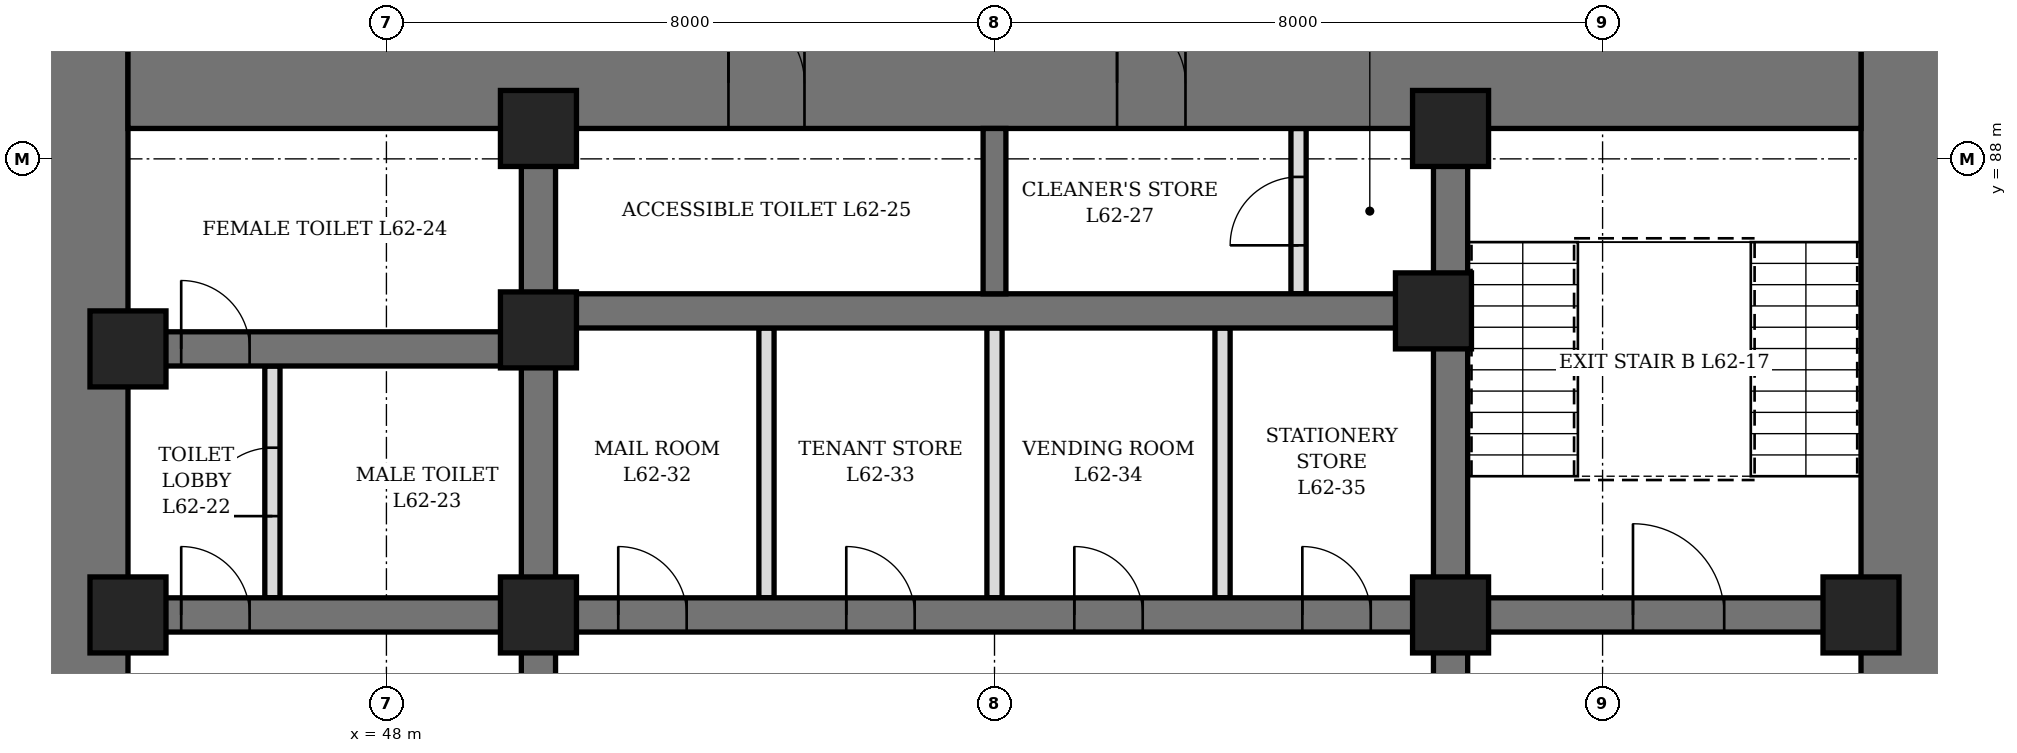
"""IFC4 building model, lengths in metres.
Left out: names, types, materials, properties, quantities, classifications, styles, units other than length and angle.
Written with IfcOpenShell. Run it as: python <this file> out.ifc"""

import sys

from ifc_helpers import new_model, si_unit, direction, frame, frame_2d, origin, origin_2d, place, context, subcontext, project, spatial, rectangle, hollow_rectangle, extrude, element, fill, save


model = new_model("IFC4")
c1 = context("Model", 3, precision=1e-05, world=origin(), true_north=direction((0.0, 1.0)))
c2 = subcontext(c1, "Body", "Model", "MODEL_VIEW")
j1 = project(units=[si_unit("LENGTHUNIT", "METRE"), si_unit("PLANEANGLEUNIT", "RADIAN")], contexts=[c1])
p1 = place(None, origin())
s1 = spatial("IfcSite", under=j1, at=p1, CompositionType="ELEMENT")
p2 = place(p1, origin())
s2 = spatial("IfcBuilding", under=s1, at=p2, CompositionType="ELEMENT")
p3 = place(p2, frame((0.0, 0.0, 275.5)))
s3 = spatial("IfcBuildingStorey", under=s2, at=p3, CompositionType="ELEMENT", Elevation=275.5)
p4 = place(p3, frame((44.0, 70.4, 0.0), z_axis=(0.0, 0.0, 1.0), x_axis=(0.0, 1.0, 0.0)))
e1 = element("IfcWall", 1, at=p4, inside=s3, PredefinedType="SHEAR", context=c2, shape_type="SweptSolid", body=[
    extrude(rectangle(XDim=19.2, YDim=1.2, at=frame_2d((9.6, 0.0))), origin(), (0.0, 0.0, 1.0), 4.2),
])
p5 = place(p4, frame((8.6, 0.0, 0.0)))
e2 = element("IfcOpeningElement", 2, at=p5, cuts=e1, PredefinedType="OPENING", context=c2, shape_type="SweptSolid", body=[
    extrude(rectangle(XDim=2.0, YDim=2.4, at=frame_2d((1.0, 1.2))), frame((0.0, 0.61, 0.0), z_axis=(0.0, -1.0, 0.0), x_axis=(1.0, 0.0, 0.0)), (0.0, 0.0, 1.0), 1.22),
])
p6 = place(p3, frame((68.0, 70.4, 0.0), z_axis=(0.0, 0.0, 1.0), x_axis=(0.0, 1.0, 0.0)))
e3 = element("IfcWall", 3, at=p6, inside=s3, PredefinedType="SHEAR", context=c2, shape_type="SweptSolid", body=[
    extrude(rectangle(XDim=19.2, YDim=1.2, at=frame_2d((9.6, 0.0))), origin(), (0.0, 0.0, 1.0), 4.2),
])
p7 = place(p6, frame((8.6, 0.0, 0.0)))
e4 = element("IfcOpeningElement", 4, at=p7, cuts=e3, PredefinedType="OPENING", context=c2, shape_type="SweptSolid", body=[
    extrude(rectangle(XDim=2.0, YDim=2.4, at=frame_2d((1.0, 1.2))), frame((0.0, 0.61, 0.0), z_axis=(0.0, -1.0, 0.0), x_axis=(1.0, 0.0, 0.0)), (0.0, 0.0, 1.0), 1.22),
])
p8 = place(p3, frame((44.6, 89.0, 0.0), z_axis=(0.0, 0.0, 1.0), x_axis=(1.0, 0.0, 0.0)))
e5 = element("IfcWall", 5, at=p8, inside=s3, PredefinedType="SHEAR", context=c2, shape_type="SweptSolid", body=[
    extrude(rectangle(XDim=22.8, YDim=1.2, at=frame_2d((11.4, 0.0))), origin(), (0.0, 0.0, 1.0), 4.2),
])
p9 = place(p8, frame((7.9, 0.0, 0.0)))
e6 = element("IfcOpeningElement", 6, at=p9, cuts=e5, PredefinedType="OPENING", context=c2, shape_type="SweptSolid", body=[
    extrude(rectangle(XDim=1.0, YDim=2.1, at=frame_2d((0.5, 1.05))), frame((0.0, 0.61, 0.0), z_axis=(0.0, -1.0, 0.0), x_axis=(1.0, 0.0, 0.0)), (0.0, 0.0, 1.0), 1.22),
])
p10 = place(p8, frame((13.012, 0.0, 0.0)))
e7 = element("IfcOpeningElement", 7, at=p10, cuts=e5, PredefinedType="OPENING", context=c2, shape_type="SweptSolid", body=[
    extrude(rectangle(XDim=0.9, YDim=2.1, at=frame_2d((0.45, 1.05))), frame((0.0, 0.61, 0.0), z_axis=(0.0, -1.0, 0.0), x_axis=(1.0, 0.0, 0.0)), (0.0, 0.0, 1.0), 1.22),
])
p11 = place(p3, frame((50.0, 71.6, 0.0), z_axis=(0.0, 0.0, 1.0), x_axis=(0.0, 1.0, 0.0)))
e8 = element("IfcWall", 8, at=p11, inside=s3, PredefinedType="SHEAR", context=c2, shape_type="SweptSolid", body=[
    extrude(rectangle(XDim=16.8, YDim=0.45, at=frame_2d((8.4, 0.0))), origin(), (0.0, 0.0, 1.0), 4.2),
])
p12 = place(p11, frame((7.5, 0.0, 0.0)))
e9 = element("IfcOpeningElement", 9, at=p12, cuts=e8, PredefinedType="OPENING", context=c2, shape_type="SweptSolid", body=[
    extrude(rectangle(XDim=1.8, YDim=2.4, at=frame_2d((0.9, 1.2))), frame((0.0, 0.235, 0.0), z_axis=(0.0, -1.0, 0.0), x_axis=(1.0, 0.0, 0.0)), (0.0, 0.0, 1.0), 0.47),
])
p13 = place(p3, frame((62.0, 71.6, 0.0), z_axis=(0.0, 0.0, 1.0), x_axis=(0.0, 1.0, 0.0)))
e10 = element("IfcWall", 10, at=p13, inside=s3, PredefinedType="SHEAR", context=c2, shape_type="SweptSolid", body=[
    extrude(rectangle(XDim=16.8, YDim=0.45, at=frame_2d((8.4, 0.0))), origin(), (0.0, 0.0, 1.0), 4.2),
])
p14 = place(p13, frame((7.5, 0.0, 0.0)))
e11 = element("IfcOpeningElement", 11, at=p14, cuts=e10, PredefinedType="OPENING", context=c2, shape_type="SweptSolid", body=[
    extrude(rectangle(XDim=1.8, YDim=2.4, at=frame_2d((0.9, 1.2))), frame((0.0, 0.235, 0.0), z_axis=(0.0, -1.0, 0.0), x_axis=(1.0, 0.0, 0.0)), (0.0, 0.0, 1.0), 0.47),
])
p15 = place(p3, frame((44.6, 82.0, 0.0), z_axis=(0.0, 0.0, 1.0), x_axis=(1.0, 0.0, 0.0)))
e12 = element("IfcWall", 12, at=p15, inside=s3, PredefinedType="SHEAR", context=c2, shape_type="SweptSolid", body=[
    extrude(rectangle(XDim=5.175, YDim=0.45, at=frame_2d((2.587, 0.0))), origin(), (0.0, 0.0, 1.0), 4.2),
])
p16 = place(p15, frame((0.7, 0.0, 0.0)))
e13 = element("IfcOpeningElement", 13, at=p16, cuts=e12, PredefinedType="OPENING", context=c2, shape_type="SweptSolid", body=[
    extrude(rectangle(XDim=0.9, YDim=2.1, at=frame_2d((0.45, 1.05))), frame((0.0, 0.235, 0.0), z_axis=(0.0, -1.0, 0.0), x_axis=(1.0, 0.0, 0.0)), (0.0, 0.0, 1.0), 0.47),
])
p17 = place(p3, frame((44.6, 85.5, 0.0), z_axis=(0.0, 0.0, 1.0), x_axis=(1.0, 0.0, 0.0)))
e14 = element("IfcWall", 14, at=p17, inside=s3, PredefinedType="SHEAR", context=c2, shape_type="SweptSolid", body=[
    extrude(rectangle(XDim=5.175, YDim=0.45, at=frame_2d((2.587, 0.0))), origin(), (0.0, 0.0, 1.0), 4.2),
])
p18 = place(p17, frame((0.7, 0.0, 0.0)))
e15 = element("IfcOpeningElement", 15, at=p18, cuts=e14, PredefinedType="OPENING", context=c2, shape_type="SweptSolid", body=[
    extrude(rectangle(XDim=0.9, YDim=2.1, at=frame_2d((0.45, 1.05))), frame((0.0, 0.235, 0.0), z_axis=(0.0, -1.0, 0.0), x_axis=(1.0, 0.0, 0.0)), (0.0, 0.0, 1.0), 0.47),
])
p19 = place(p3, frame((62.225, 82.0, 0.0), z_axis=(0.0, 0.0, 1.0), x_axis=(1.0, 0.0, 0.0)))
e16 = element("IfcWall", 16, at=p19, inside=s3, PredefinedType="SHEAR", context=c2, shape_type="SweptSolid", body=[
    extrude(rectangle(XDim=5.175, YDim=0.45, at=frame_2d((2.587, 0.0))), origin(), (0.0, 0.0, 1.0), 4.2),
])
p20 = place(p19, frame((2.175, 0.0, 0.0)))
e17 = element("IfcOpeningElement", 17, at=p20, cuts=e16, PredefinedType="OPENING", context=c2, shape_type="SweptSolid", body=[
    extrude(rectangle(XDim=1.2, YDim=2.1, at=frame_2d((0.6, 1.05))), frame((0.0, 0.235, 0.0), z_axis=(0.0, -1.0, 0.0), x_axis=(1.0, 0.0, 0.0)), (0.0, 0.0, 1.0), 0.47),
])
p21 = place(p3, frame((50.225, 82.0, 0.0), z_axis=(0.0, 0.0, 1.0), x_axis=(1.0, 0.0, 0.0)))
e18 = element("IfcWall", 18, at=p21, inside=s3, PredefinedType="SHEAR", context=c2, shape_type="SweptSolid", body=[
    extrude(rectangle(XDim=11.55, YDim=0.45, at=frame_2d((5.775, 0.0))), origin(), (0.0, 0.0, 1.0), 4.2),
])
p22 = place(p21, frame((0.825, 0.0, 0.0)))
e19 = element("IfcOpeningElement", 19, at=p22, cuts=e18, PredefinedType="OPENING", context=c2, shape_type="SweptSolid", body=[
    extrude(rectangle(XDim=0.9, YDim=2.1, at=frame_2d((0.45, 1.05))), frame((0.0, 0.235, 0.0), z_axis=(0.0, -1.0, 0.0), x_axis=(1.0, 0.0, 0.0)), (0.0, 0.0, 1.0), 0.47),
])
p23 = place(p21, frame((3.825, 0.0, 0.0)))
e20 = element("IfcOpeningElement", 20, at=p23, cuts=e18, PredefinedType="OPENING", context=c2, shape_type="SweptSolid", body=[
    extrude(rectangle(XDim=0.9, YDim=2.1, at=frame_2d((0.45, 1.05))), frame((0.0, 0.235, 0.0), z_axis=(0.0, -1.0, 0.0), x_axis=(1.0, 0.0, 0.0)), (0.0, 0.0, 1.0), 0.47),
])
p24 = place(p21, frame((6.825, 0.0, 0.0)))
e21 = element("IfcOpeningElement", 21, at=p24, cuts=e18, PredefinedType="OPENING", context=c2, shape_type="SweptSolid", body=[
    extrude(rectangle(XDim=0.9, YDim=2.1, at=frame_2d((0.45, 1.05))), frame((0.0, 0.235, 0.0), z_axis=(0.0, -1.0, 0.0), x_axis=(1.0, 0.0, 0.0)), (0.0, 0.0, 1.0), 0.47),
])
p25 = place(p21, frame((9.825, 0.0, 0.0)))
e22 = element("IfcOpeningElement", 22, at=p25, cuts=e18, PredefinedType="OPENING", context=c2, shape_type="SweptSolid", body=[
    extrude(rectangle(XDim=0.9, YDim=2.1, at=frame_2d((0.45, 1.05))), frame((0.0, 0.235, 0.0), z_axis=(0.0, -1.0, 0.0), x_axis=(1.0, 0.0, 0.0)), (0.0, 0.0, 1.0), 0.47),
])
p26 = place(p3, frame((50.225, 86.0, 0.0), z_axis=(0.0, 0.0, 1.0), x_axis=(1.0, 0.0, 0.0)))
e23 = element("IfcWall", 23, at=p26, inside=s3, PredefinedType="SHEAR", context=c2, shape_type="SweptSolid", body=[
    extrude(rectangle(XDim=11.55, YDim=0.45, at=frame_2d((5.775, 0.0))), origin(), (0.0, 0.0, 1.0), 4.2),
])
p27 = place(p3, frame((56.0, 86.225, 0.0), z_axis=(0.0, 0.0, 1.0), x_axis=(0.0, 1.0, 0.0)))
e24 = element("IfcWall", 24, at=p27, inside=s3, PredefinedType="SHEAR", context=c2, shape_type="SweptSolid", body=[
    extrude(rectangle(XDim=2.175, YDim=0.3, at=frame_2d((1.087, 0.0))), origin(), (0.0, 0.0, 1.0), 4.2),
])
for number, where, z_axis, x_axis in (
    (25, (44.6, 82.0, 0.0), (0.0, 0.0, 1.0), (1.0, 0.0, 0.0)),
    (26, (44.6, 85.5, 0.0), (0.0, 0.0, 1.0), (1.0, 0.0, 0.0)),
    (27, (50.0, 82.0, 0.0), (0.0, 0.0, 1.0), (1.0, 0.0, 0.0)),
    (28, (50.0, 85.75, 0.0), (0.0, 0.0, 1.0), (1.0, 0.0, 0.0)),
    (29, (50.0, 88.4, 0.0), (0.0, 0.0, 1.0), (1.0, 0.0, 0.0)),
    (30, (61.775, 86.0, 0.0), (0.0, 0.0, 1.0), (1.0, 0.0, 0.0)),
    (31, (62.0, 82.0, 0.0), (0.0, 0.0, 1.0), (1.0, 0.0, 0.0)),
    (32, (62.0, 88.4, 0.0), (0.0, 0.0, 1.0), (1.0, 0.0, 0.0)),
    (33, (67.4, 82.0, 0.0), (0.0, 0.0, 1.0), (1.0, 0.0, 0.0)),
):
    element("IfcColumn", number, at=place(p3, frame(where, z_axis=z_axis, x_axis=x_axis)), inside=s3, PredefinedType="COLUMN", context=c2, shape_type="SweptSolid", body=[
        extrude(hollow_rectangle(XDim=1.0, YDim=1.0, WallThickness=0.15, at=origin_2d()), origin(), (0.0, 0.0, 1.0), 4.2),
    ])
p28 = place(p3, frame((46.5, 82.225, 0.0), z_axis=(0.0, 0.0, 1.0), x_axis=(0.0, 1.0, 0.0)))
e34 = element("IfcWall", 34, at=p28, inside=s3, PredefinedType="PARTITIONING", context=c2, shape_type="SweptSolid", body=[
    extrude(rectangle(XDim=3.05, YDim=0.2, at=frame_2d((1.525, 0.0))), origin(), (0.0, 0.0, 1.0), 3.95),
])
p29 = place(p28, frame((1.075, 0.0, 0.0)))
e35 = element("IfcOpeningElement", 35, at=p29, cuts=e34, PredefinedType="OPENING", context=c2, shape_type="SweptSolid", body=[
    extrude(rectangle(XDim=0.9, YDim=2.1, at=frame_2d((0.45, 1.05))), frame((0.0, 0.11, 0.0), z_axis=(0.0, -1.0, 0.0), x_axis=(1.0, 0.0, 0.0)), (0.0, 0.0, 1.0), 0.22),
])
p30 = place(p3, frame((60.0, 86.225, 0.0), z_axis=(0.0, 0.0, 1.0), x_axis=(0.0, 1.0, 0.0)))
e36 = element("IfcWall", 36, at=p30, inside=s3, PredefinedType="PARTITIONING", context=c2, shape_type="SweptSolid", body=[
    extrude(rectangle(XDim=2.175, YDim=0.2, at=frame_2d((1.087, 0.0))), origin(), (0.0, 0.0, 1.0), 3.95),
])
p31 = place(p30, frame((0.637, 0.0, 0.0)))
e37 = element("IfcOpeningElement", 37, at=p31, cuts=e36, PredefinedType="OPENING", context=c2, shape_type="SweptSolid", body=[
    extrude(rectangle(XDim=0.9, YDim=2.1, at=frame_2d((0.45, 1.05))), frame((0.0, 0.11, 0.0), z_axis=(0.0, -1.0, 0.0), x_axis=(1.0, 0.0, 0.0)), (0.0, 0.0, 1.0), 0.22),
])
p32 = place(p3, frame((53.0, 82.225, 0.0), z_axis=(0.0, 0.0, 1.0), x_axis=(0.0, 1.0, 0.0)))
e38 = element("IfcWall", 38, at=p32, inside=s3, PredefinedType="PARTITIONING", context=c2, shape_type="SweptSolid", body=[
    extrude(rectangle(XDim=3.55, YDim=0.2, at=frame_2d((1.775, 0.0))), origin(), (0.0, 0.0, 1.0), 3.95),
])
p33 = place(p3, frame((56.0, 82.225, 0.0), z_axis=(0.0, 0.0, 1.0), x_axis=(0.0, 1.0, 0.0)))
e39 = element("IfcWall", 39, at=p33, inside=s3, PredefinedType="PARTITIONING", context=c2, shape_type="SweptSolid", body=[
    extrude(rectangle(XDim=3.55, YDim=0.2, at=frame_2d((1.775, 0.0))), origin(), (0.0, 0.0, 1.0), 2.45),
])
p34 = place(p3, frame((59.0, 82.225, 0.0), z_axis=(0.0, 0.0, 1.0), x_axis=(0.0, 1.0, 0.0)))
e40 = element("IfcWall", 40, at=p34, inside=s3, PredefinedType="PARTITIONING", context=c2, shape_type="SweptSolid", body=[
    extrude(rectangle(XDim=3.55, YDim=0.2, at=frame_2d((1.775, 0.0))), origin(), (0.0, 0.0, 1.0), 3.95),
])
p35 = place(p16, origin())
e41 = element("IfcDoor", 41, at=p35, inside=s3, OperationType="SINGLE_SWING_LEFT", PredefinedType="DOOR", context=c2, shape_type="SweptSolid", body=[
    extrude(rectangle(XDim=0.9, YDim=2.1, at=frame_2d((0.45, 1.05))), frame((0.0, 0.225, 0.0), z_axis=(0.0, -1.0, 0.0), x_axis=(1.0, 0.0, 0.0)), (0.0, 0.0, 1.0), 0.449),
])
fill(e13, e41)
p36 = place(p29, origin())
e42 = element("IfcDoor", 42, at=p36, inside=s3, OperationType="SINGLE_SWING_RIGHT", PredefinedType="DOOR", context=c2, shape_type="SweptSolid", body=[
    extrude(rectangle(XDim=0.9, YDim=2.1, at=frame_2d((0.45, 1.05))), frame((0.0, 0.1, 0.0), z_axis=(0.0, -1.0, 0.0), x_axis=(1.0, 0.0, 0.0)), (0.0, 0.0, 1.0), 0.199),
])
fill(e35, e42)
p37 = place(p18, origin())
e43 = element("IfcDoor", 43, at=p37, inside=s3, OperationType="SINGLE_SWING_RIGHT", PredefinedType="DOOR", context=c2, shape_type="SweptSolid", body=[
    extrude(rectangle(XDim=0.9, YDim=2.1, at=frame_2d((0.45, 1.05))), frame((0.0, 0.225, 0.0), z_axis=(0.0, -1.0, 0.0), x_axis=(1.0, 0.0, 0.0)), (0.0, 0.0, 1.0), 0.449),
])
fill(e15, e43)
p38 = place(p9, origin())
e44 = element("IfcDoor", 44, at=p38, inside=s3, OperationType="SINGLE_SWING_LEFT", PredefinedType="DOOR", context=c2, shape_type="SweptSolid", body=[
    extrude(rectangle(XDim=1.0, YDim=2.1, at=frame_2d((0.5, 1.05))), frame((0.0, 0.35, 0.0), z_axis=(0.0, -1.0, 0.0), x_axis=(1.0, 0.0, 0.0)), (0.0, 0.0, 1.0), 0.7),
])
fill(e6, e44)
p39 = place(p10, origin())
e45 = element("IfcDoor", 45, at=p39, inside=s3, OperationType="SINGLE_SWING_LEFT", PredefinedType="DOOR", context=c2, shape_type="SweptSolid", body=[
    extrude(rectangle(XDim=0.9, YDim=2.1, at=frame_2d((0.45, 1.05))), frame((0.0, 0.35, 0.0), z_axis=(0.0, -1.0, 0.0), x_axis=(1.0, 0.0, 0.0)), (0.0, 0.0, 1.0), 0.7),
])
fill(e7, e45)
p40 = place(p31, origin())
e46 = element("IfcDoor", 46, at=p40, inside=s3, OperationType="SINGLE_SWING_LEFT", PredefinedType="DOOR", context=c2, shape_type="SweptSolid", body=[
    extrude(rectangle(XDim=0.9, YDim=2.1, at=frame_2d((0.45, 1.05))), frame((0.0, 0.1, 0.0), z_axis=(0.0, -1.0, 0.0), x_axis=(1.0, 0.0, 0.0)), (0.0, 0.0, 1.0), 0.199),
])
fill(e37, e46)
p41 = place(p22, origin())
e47 = element("IfcDoor", 47, at=p41, inside=s3, OperationType="SINGLE_SWING_LEFT", PredefinedType="DOOR", context=c2, shape_type="SweptSolid", body=[
    extrude(rectangle(XDim=0.9, YDim=2.1, at=frame_2d((0.45, 1.05))), frame((0.0, 0.225, 0.0), z_axis=(0.0, -1.0, 0.0), x_axis=(1.0, 0.0, 0.0)), (0.0, 0.0, 1.0), 0.449),
])
fill(e19, e47)
p42 = place(p23, origin())
e48 = element("IfcDoor", 48, at=p42, inside=s3, OperationType="SINGLE_SWING_LEFT", PredefinedType="DOOR", context=c2, shape_type="SweptSolid", body=[
    extrude(rectangle(XDim=0.9, YDim=2.1, at=frame_2d((0.45, 1.05))), frame((0.0, 0.225, 0.0), z_axis=(0.0, -1.0, 0.0), x_axis=(1.0, 0.0, 0.0)), (0.0, 0.0, 1.0), 0.449),
])
fill(e20, e48)
p43 = place(p24, origin())
e49 = element("IfcDoor", 49, at=p43, inside=s3, OperationType="SINGLE_SWING_LEFT", PredefinedType="DOOR", context=c2, shape_type="SweptSolid", body=[
    extrude(rectangle(XDim=0.9, YDim=2.1, at=frame_2d((0.45, 1.05))), frame((0.0, 0.225, 0.0), z_axis=(0.0, -1.0, 0.0), x_axis=(1.0, 0.0, 0.0)), (0.0, 0.0, 1.0), 0.449),
])
fill(e21, e49)
p44 = place(p25, origin())
e50 = element("IfcDoor", 50, at=p44, inside=s3, OperationType="SINGLE_SWING_LEFT", PredefinedType="DOOR", context=c2, shape_type="SweptSolid", body=[
    extrude(rectangle(XDim=0.9, YDim=2.1, at=frame_2d((0.45, 1.05))), frame((0.0, 0.225, 0.0), z_axis=(0.0, -1.0, 0.0), x_axis=(1.0, 0.0, 0.0)), (0.0, 0.0, 1.0), 0.449),
])
fill(e22, e50)
p45 = place(p20, origin())
e51 = element("IfcDoor", 51, at=p45, inside=s3, OperationType="SINGLE_SWING_LEFT", PredefinedType="DOOR", context=c2, shape_type="SweptSolid", body=[
    extrude(rectangle(XDim=1.2, YDim=2.1, at=frame_2d((0.6, 1.05))), frame((0.0, 0.225, 0.0), z_axis=(0.0, -1.0, 0.0), x_axis=(1.0, 0.0, 0.0)), (0.0, 0.0, 1.0), 0.449),
])
fill(e17, e51)
save(model, sys.argv[1])
